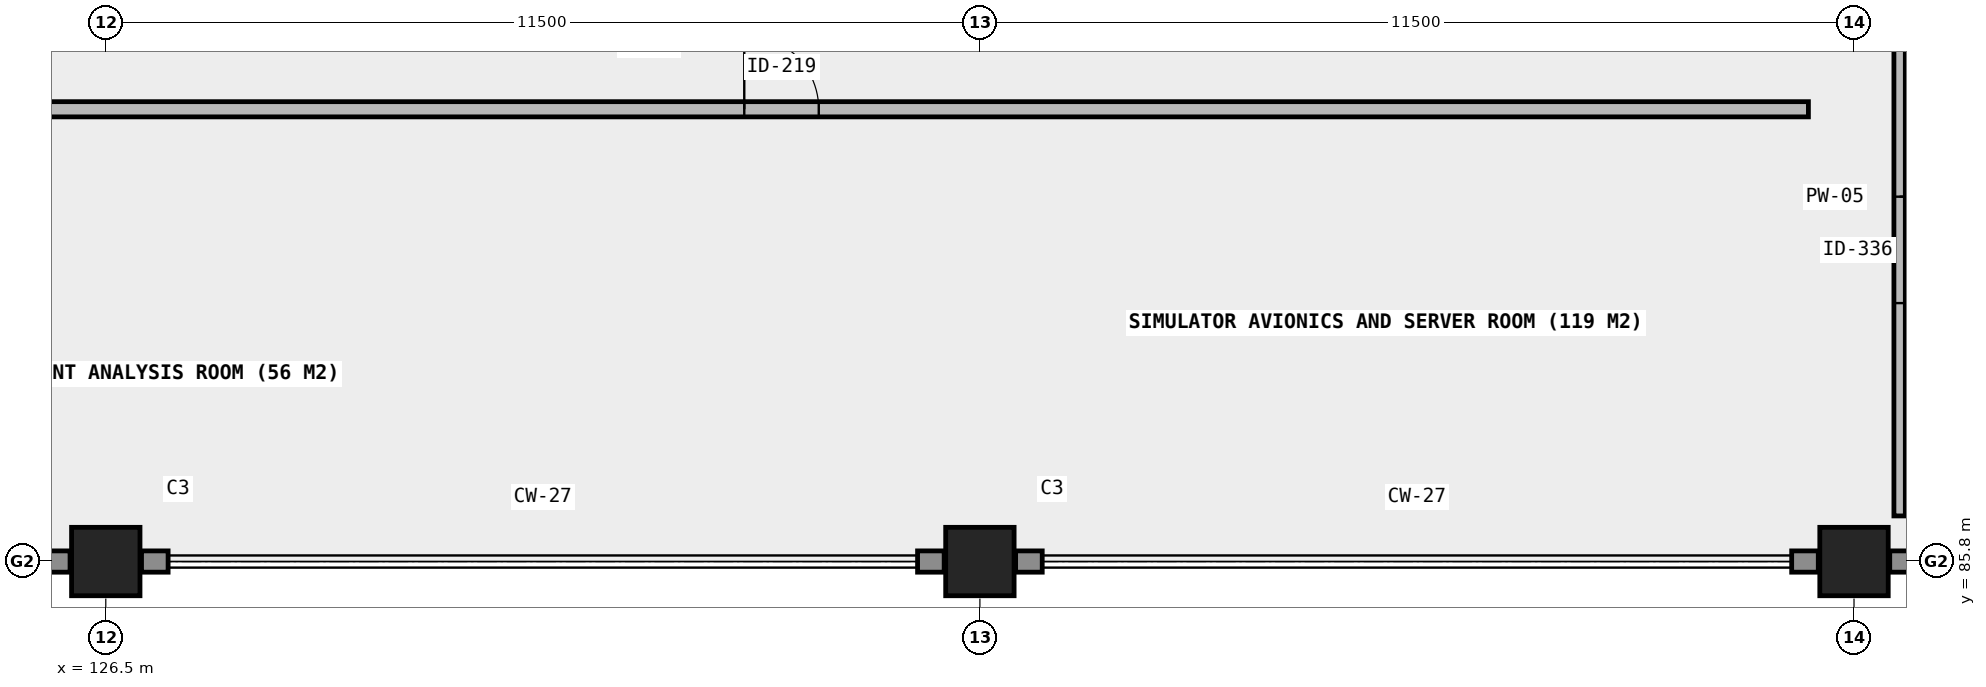
"""IFC4 building model, lengths in metres.
Left out: names, types, materials, properties, quantities, classifications, styles, units other than length and angle.
Written with IfcOpenShell. Run it as: python <this file> out.ifc"""

import sys

from ifc_helpers import new_model, si_unit, direction, frame, frame_2d, origin, origin_2d, place, context, subcontext, project, spatial, rectangle, extrude, element, fill, save


model = new_model("IFC4")
c1 = context("Model", 3, precision=1e-05, world=origin(), true_north=direction((0.0, 1.0)))
c2 = subcontext(c1, "Body", "Model", "MODEL_VIEW")
j1 = project(units=[si_unit("LENGTHUNIT", "METRE"), si_unit("PLANEANGLEUNIT", "RADIAN")], contexts=[c1])
p1 = place(None, origin())
s1 = spatial("IfcSite", under=j1, at=p1, CompositionType="ELEMENT")
p2 = place(p1, origin())
s2 = spatial("IfcBuilding", under=s1, at=p2, CompositionType="ELEMENT")
p3 = place(p2, frame((0.0, 0.0, 18.3)))
s3 = spatial("IfcBuildingStorey", under=s2, at=p3, CompositionType="ELEMENT", Elevation=18.3)
for number, where, z_axis, x_axis in (
    (1, (126.5, 85.8, 0.0), (0.0, 0.0, 1.0), (1.0, 0.0, 0.0)),
    (2, (138.0, 85.8, 0.0), (0.0, 0.0, 1.0), (1.0, 0.0, 0.0)),
    (3, (149.5, 85.8, 0.0), (0.0, 0.0, 1.0), (1.0, 0.0, 0.0)),
):
    element("IfcColumn", number, at=place(p3, frame(where, z_axis=z_axis, x_axis=x_axis)), inside=s3, PredefinedType="COLUMN", context=c2, shape_type="SweptSolid", body=[
        extrude(rectangle(XDim=0.9, YDim=0.9, at=origin_2d()), origin(), (0.0, 0.0, 1.0), 4.16),
    ])
p4 = place(p3, frame((115.47, 85.8, 0.0), z_axis=(0.0, 0.0, 1.0), x_axis=(1.0, 0.0, 0.0)))
e4 = element("IfcWall", 4, at=p4, inside=s3, PredefinedType="SOLIDWALL", context=c2, shape_type="SweptSolid", body=[
    extrude(rectangle(XDim=10.56, YDim=0.28, at=frame_2d((5.28, 0.0))), origin(), (0.0, 0.0, 1.0), 3.1),
])
p5 = place(p4, frame((2.487, 0.0, 0.85)))
e5 = element("IfcOpeningElement", 5, at=p5, cuts=e4, PredefinedType="OPENING", context=c2, shape_type="SweptSolid", body=[
    extrude(rectangle(XDim=1.55, YDim=1.85, at=frame_2d((0.775, 0.925))), frame((0.0, 0.15, 0.0), z_axis=(0.0, -1.0, 0.0), x_axis=(1.0, 0.0, 0.0)), (0.0, 0.0, 1.0), 0.3),
])
p6 = place(p4, frame((6.523, 0.0, 0.85)))
e6 = element("IfcOpeningElement", 6, at=p6, cuts=e4, PredefinedType="OPENING", context=c2, shape_type="SweptSolid", body=[
    extrude(rectangle(XDim=1.55, YDim=1.85, at=frame_2d((0.775, 0.925))), frame((0.0, 0.15, 0.0), z_axis=(0.0, -1.0, 0.0), x_axis=(1.0, 0.0, 0.0)), (0.0, 0.0, 1.0), 0.3),
])
for number, where, z_axis, x_axis in (
    (7, (126.97, 85.8, 0.0), (0.0, 0.0, 1.0), (1.0, 0.0, 0.0)),
    (8, (137.18, 85.8, 0.0), (0.0, 0.0, 1.0), (1.0, 0.0, 0.0)),
    (9, (138.47, 85.8, 0.0), (0.0, 0.0, 1.0), (1.0, 0.0, 0.0)),
    (10, (148.68, 85.8, 0.0), (0.0, 0.0, 1.0), (1.0, 0.0, 0.0)),
):
    element("IfcWall", number, at=place(p3, frame(where, z_axis=z_axis, x_axis=x_axis)), inside=s3, PredefinedType="SOLIDWALL", context=c2, shape_type="SweptSolid", body=[
        extrude(rectangle(XDim=0.35, YDim=0.28, at=frame_2d((0.175, 0.0))), origin(), (0.0, 0.0, 1.0), 3.89),
    ])
p7 = place(p3, frame((149.97, 85.8, 0.0), z_axis=(0.0, 0.0, 1.0), x_axis=(1.0, 0.0, 0.0)))
e11 = element("IfcWall", 11, at=p7, inside=s3, PredefinedType="SOLIDWALL", context=c2, shape_type="SweptSolid", body=[
    extrude(rectangle(XDim=10.56, YDim=0.28, at=frame_2d((5.28, 0.0))), origin(), (0.0, 0.0, 1.0), 3.1),
])
p8 = place(p7, frame((2.487, 0.0, 0.85)))
e12 = element("IfcOpeningElement", 12, at=p8, cuts=e11, PredefinedType="OPENING", context=c2, shape_type="SweptSolid", body=[
    extrude(rectangle(XDim=1.55, YDim=1.85, at=frame_2d((0.775, 0.925))), frame((0.0, 0.15, 0.0), z_axis=(0.0, -1.0, 0.0), x_axis=(1.0, 0.0, 0.0)), (0.0, 0.0, 1.0), 0.3),
])
p9 = place(p7, frame((6.523, 0.0, 0.85)))
e13 = element("IfcOpeningElement", 13, at=p9, cuts=e11, PredefinedType="OPENING", context=c2, shape_type="SweptSolid", body=[
    extrude(rectangle(XDim=1.55, YDim=1.85, at=frame_2d((0.775, 0.925))), frame((0.0, 0.15, 0.0), z_axis=(0.0, -1.0, 0.0), x_axis=(1.0, 0.0, 0.0)), (0.0, 0.0, 1.0), 0.3),
])
p10 = place(p3, frame((118.4, 91.75, 0.0), z_axis=(0.0, 0.0, 1.0), x_axis=(1.0, 0.0, 0.0)))
e14 = element("IfcWall", 14, at=p10, inside=s3, PredefinedType="PARTITIONING", context=c2, shape_type="SweptSolid", body=[
    extrude(rectangle(XDim=30.5, YDim=0.2, at=frame_2d((15.25, 0.0))), origin(), (0.0, 0.0, 1.0), 3.88),
])
p11 = place(p10, frame((4.2, 0.0, 0.0)))
e15 = element("IfcOpeningElement", 15, at=p11, cuts=e14, PredefinedType="OPENING", context=c2, shape_type="SweptSolid", body=[
    extrude(rectangle(XDim=1.8, YDim=2.2, at=frame_2d((0.9, 1.1))), frame((0.0, 0.11, 0.0), z_axis=(0.0, -1.0, 0.0), x_axis=(1.0, 0.0, 0.0)), (0.0, 0.0, 1.0), 0.22),
])
p12 = place(p10, frame((16.5, 0.0, 0.0)))
e16 = element("IfcOpeningElement", 16, at=p12, cuts=e14, PredefinedType="OPENING", context=c2, shape_type="SweptSolid", body=[
    extrude(rectangle(XDim=0.98, YDim=2.15, at=frame_2d((0.49, 1.075))), frame((0.0, 0.11, 0.0), z_axis=(0.0, -1.0, 0.0), x_axis=(1.0, 0.0, 0.0)), (0.0, 0.0, 1.0), 0.22),
])
p13 = place(p3, frame((150.1, 86.4, 0.0), z_axis=(0.0, 0.0, 1.0), x_axis=(0.0, 1.0, 0.0)))
e17 = element("IfcWall", 17, at=p13, inside=s3, PredefinedType="PARTITIONING", context=c2, shape_type="SweptSolid", body=[
    extrude(rectangle(XDim=7.8, YDim=0.15, at=frame_2d((3.9, 0.0))), origin(), (0.0, 0.0, 1.0), 3.88),
])
p14 = place(p13, frame((2.8, 0.0, 0.0)))
e18 = element("IfcOpeningElement", 18, at=p14, cuts=e17, PredefinedType="OPENING", context=c2, shape_type="SweptSolid", body=[
    extrude(rectangle(XDim=1.4, YDim=2.15, at=frame_2d((0.7, 1.075))), frame((0.0, 0.085, 0.0), z_axis=(0.0, -1.0, 0.0), x_axis=(1.0, 0.0, 0.0)), (0.0, 0.0, 1.0), 0.17),
])
p15 = place(p12, origin())
e19 = element("IfcDoor", 19, at=p15, inside=s3, OperationType="SINGLE_SWING_LEFT", PredefinedType="DOOR", context=c2, shape_type="SweptSolid", body=[
    extrude(rectangle(XDim=0.98, YDim=2.15, at=frame_2d((0.49, 1.075))), frame((0.0, 0.025, 0.0), z_axis=(0.0, -1.0, 0.0), x_axis=(1.0, 0.0, 0.0)), (0.0, 0.0, 1.0), 0.05),
])
fill(e16, e19)
p16 = place(p14, origin())
e20 = element("IfcDoor", 20, at=p16, inside=s3, OperationType="SINGLE_SWING_RIGHT", PredefinedType="DOOR", context=c2, shape_type="SweptSolid", body=[
    extrude(rectangle(XDim=1.4, YDim=2.15, at=frame_2d((0.7, 1.075))), frame((0.0, 0.025, 0.0), z_axis=(0.0, -1.0, 0.0), x_axis=(1.0, 0.0, 0.0)), (0.0, 0.0, 1.0), 0.05),
])
fill(e18, e20)
save(model, sys.argv[1])
